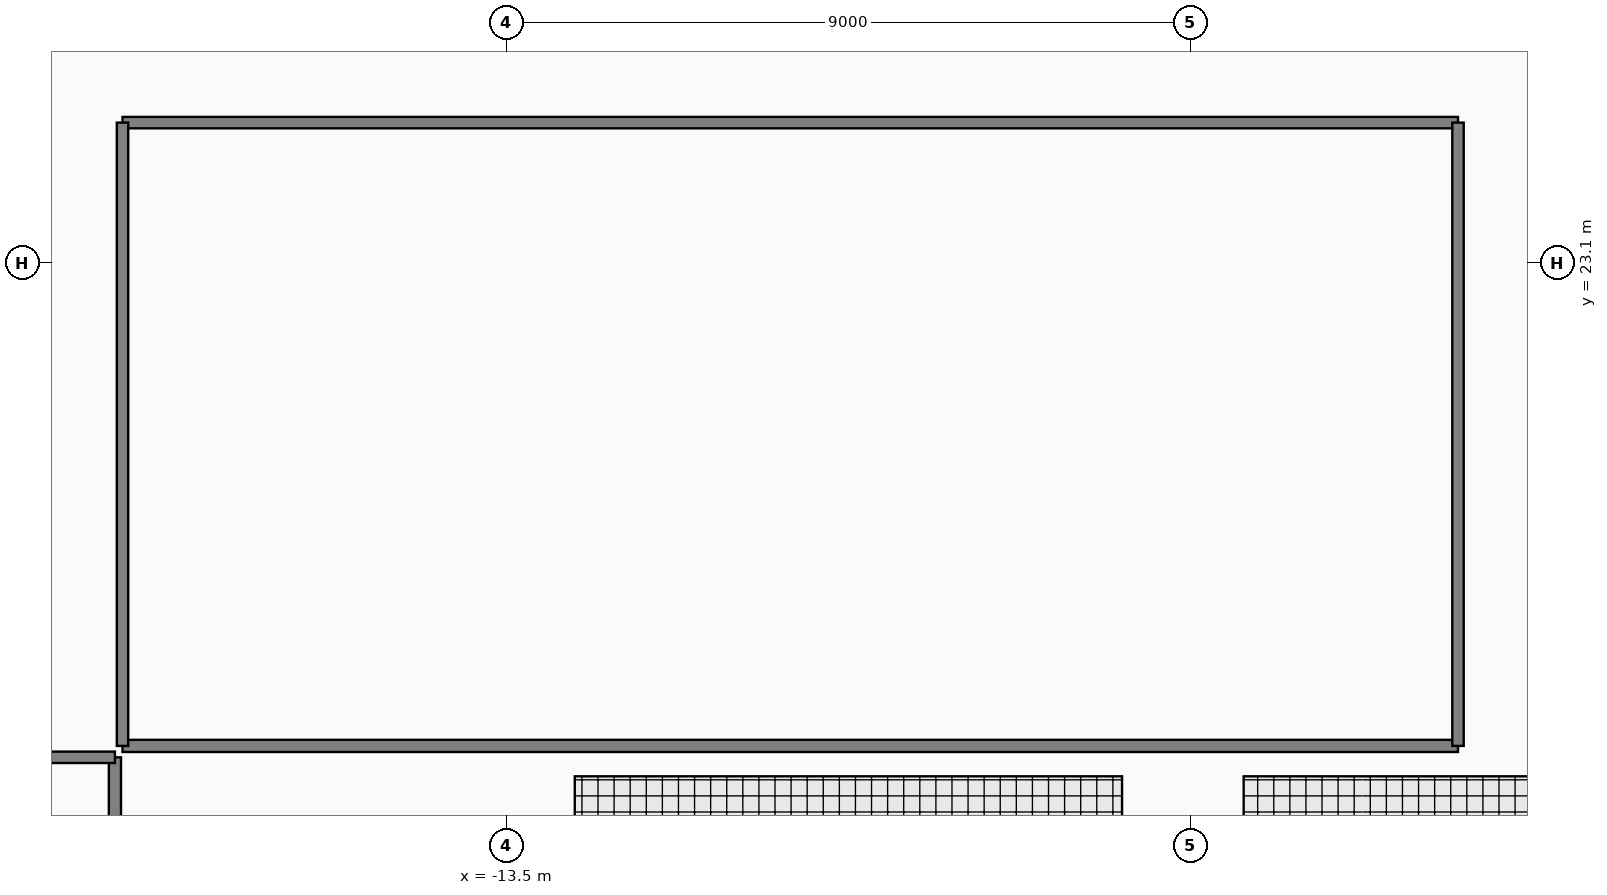
"""IFC4 building model, lengths in metres.
Left out: names, types, materials, properties, quantities, classifications, styles, units other than length and angle.
Written with IfcOpenShell. Run it as: python <this file> out.ifc"""

import sys

from ifc_helpers import new_model, si_unit, direction, frame, frame_2d, origin, place, context, subcontext, project, spatial, rectangle, extrude, element, fill, save


model = new_model("IFC4")
c1 = context("Model", 3, precision=1e-05, world=origin(), true_north=direction((0.0, 1.0)))
c2 = subcontext(c1, "Body", "Model", "MODEL_VIEW")
j1 = project(units=[si_unit("LENGTHUNIT", "METRE"), si_unit("PLANEANGLEUNIT", "RADIAN")], contexts=[c1])
p1 = place(None, origin())
s1 = spatial("IfcSite", under=j1, at=p1, CompositionType="ELEMENT")
p2 = place(p1, origin())
s2 = spatial("IfcBuilding", under=s1, at=p2, CompositionType="ELEMENT")
p3 = place(p2, frame((0.0, 0.0, 168.2)))
s3 = spatial("IfcBuildingStorey", under=s2, at=p3, CompositionType="ELEMENT", Elevation=168.2)
p4 = place(p3, frame((-18.55, 16.75, 0.0), z_axis=(0.0, 0.0, 1.0), x_axis=(1.0, 0.0, 0.0)))
e1 = element("IfcWall", 1, at=p4, inside=s3, PredefinedType="PARTITIONING", context=c2, shape_type="SweptSolid", body=[
    extrude(rectangle(XDim=17.57, YDim=0.16, at=frame_2d((8.785, 0.0))), origin(), (0.0, 0.0, 1.0), 3.974),
])
p5 = place(p4, frame((11.16, 0.0, 0.0)))
e2 = element("IfcOpeningElement", 2, at=p5, cuts=e1, PredefinedType="OPENING", context=c2, shape_type="SweptSolid", body=[
    extrude(rectangle(XDim=1.08, YDim=2.18, at=frame_2d((0.54, 1.09))), frame((0.0, 0.09, 0.0), z_axis=(0.0, -1.0, 0.0), x_axis=(1.0, 0.0, 0.0)), (0.0, 0.0, 1.0), 0.18),
])
p6 = place(p3, frame((-18.65, 1.55, 0.0), z_axis=(0.0, 0.0, 1.0), x_axis=(0.0, 1.0, 0.0)))
e3 = element("IfcWall", 3, at=p6, inside=s3, PredefinedType="PARTITIONING", context=c2, shape_type="SweptSolid", body=[
    extrude(rectangle(XDim=15.05, YDim=0.16, at=frame_2d((7.525, 0.0))), origin(), (0.0, 0.0, 1.0), 4.38),
])
p7 = place(p6, frame((6.985, 0.0, 0.0)))
e4 = element("IfcOpeningElement", 4, at=p7, cuts=e3, PredefinedType="OPENING", context=c2, shape_type="SweptSolid", body=[
    extrude(rectangle(XDim=1.08, YDim=2.18, at=frame_2d((0.54, 1.09))), frame((0.0, 0.09, 0.0), z_axis=(0.0, -1.0, 0.0), x_axis=(1.0, 0.0, 0.0)), (0.0, 0.0, 1.0), 0.18),
])
p8 = place(p3, frame((-18.55, 24.95, 0.0), z_axis=(0.0, 0.0, 1.0), x_axis=(1.0, 0.0, 0.0)))
e5 = element("IfcWall", 5, at=p8, inside=s3, PredefinedType="PARTITIONING", context=c2, shape_type="SweptSolid", body=[
    extrude(rectangle(XDim=17.57, YDim=0.15, at=frame_2d((8.785, 0.0))), origin(), (0.0, 0.0, 1.0), 3.974),
])
for number, where, z_axis, x_axis in (
    (6, (-18.55, 16.75, 0.0), (0.0, 0.0, 1.0), (0.0, 1.0, 0.0)),
    (7, (-0.98, 16.75, 0.0), (0.0, 0.0, 1.0), (0.0, 1.0, 0.0)),
):
    element("IfcWall", number, at=place(p3, frame(where, z_axis=z_axis, x_axis=x_axis)), inside=s3, PredefinedType="PARTITIONING", context=c2, shape_type="SweptSolid", body=[
        extrude(rectangle(XDim=8.2, YDim=0.15, at=frame_2d((4.1, 0.0))), origin(), (0.0, 0.0, 1.0), 4.38),
    ])
p9 = place(p3, frame((-22.69, 16.6, 0.0), z_axis=(0.0, 0.0, 1.0), x_axis=(1.0, 0.0, 0.0)))
e8 = element("IfcWall", 8, at=p9, inside=s3, PredefinedType="PARTITIONING", context=c2, shape_type="SweptSolid", body=[
    extrude(rectangle(XDim=4.04, YDim=0.15, at=frame_2d((2.02, 0.0))), origin(), (0.0, 0.0, 1.0), 4.38),
])
p10 = place(p5, origin())
e9 = element("IfcDoor", 9, at=p10, inside=s3, OperationType="SINGLE_SWING_RIGHT", PredefinedType="DOOR", context=c2, shape_type="SweptSolid", body=[
    extrude(rectangle(XDim=1.08, YDim=2.18, at=frame_2d((0.54, 1.09))), frame((0.0, 0.025, 0.0), z_axis=(0.0, -1.0, 0.0), x_axis=(1.0, 0.0, 0.0)), (0.0, 0.0, 1.0), 0.05),
])
fill(e2, e9)
save(model, sys.argv[1])
